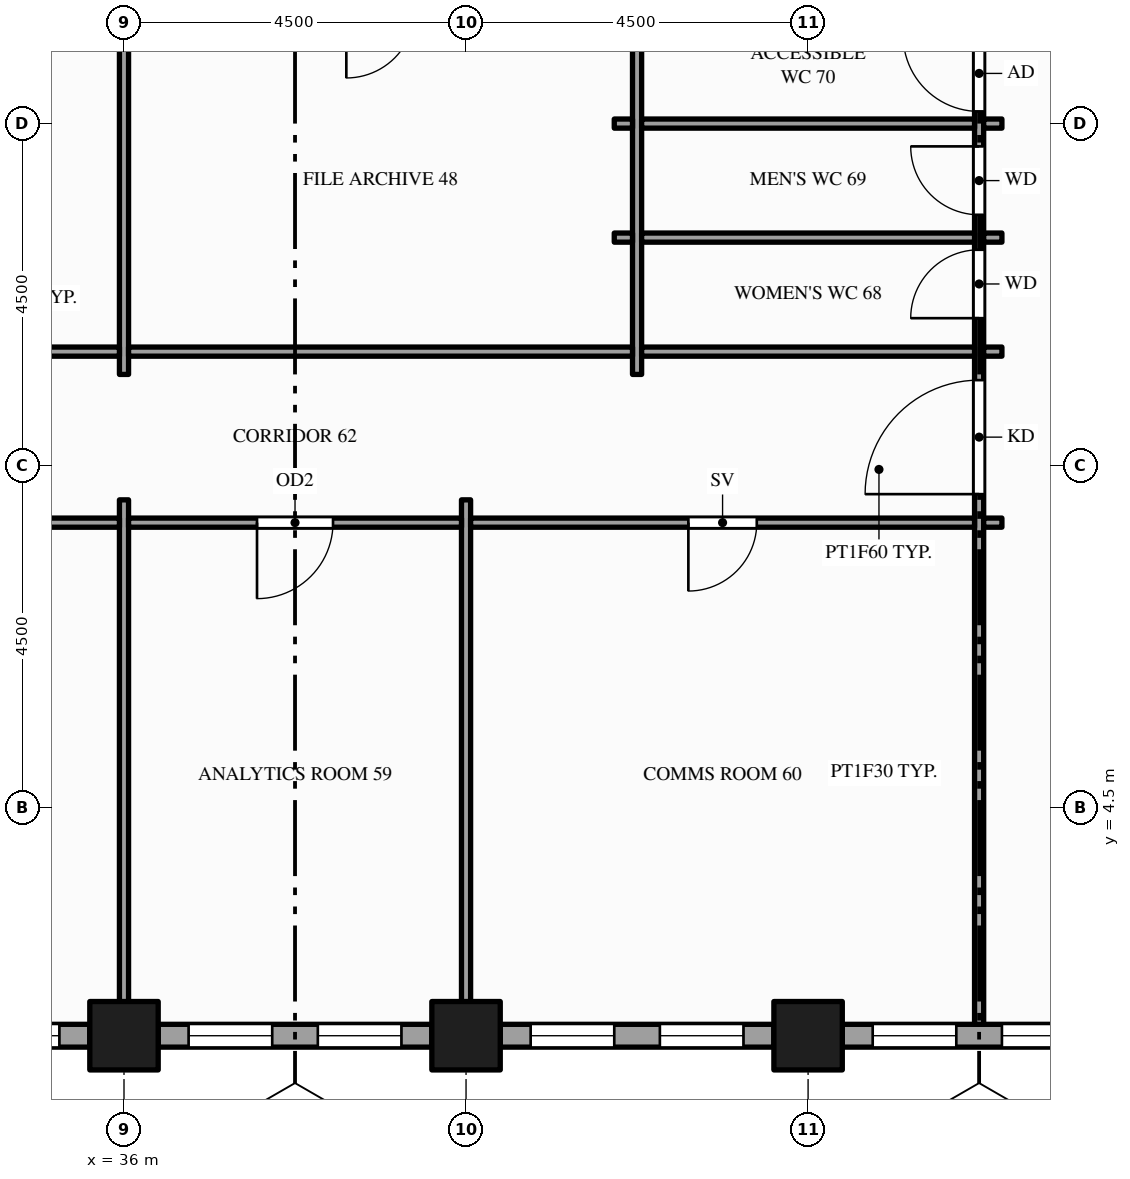
"""IFC4 building model, lengths in metres.
Left out: names, types, materials, properties, quantities, classifications, styles, units other than length and angle.
Written with IfcOpenShell. Run it as: python <this file> out.ifc"""

import sys

from ifc_helpers import new_model, si_unit, direction, frame, frame_2d, origin, origin_2d, place, context, subcontext, project, spatial, rectangle, hollow_rectangle, extrude, element, fill, save


model = new_model("IFC4")
c1 = context("Model", 3, precision=1e-05, world=origin(), true_north=direction((0.0, 1.0)))
c2 = subcontext(c1, "Body", "Model", "MODEL_VIEW")
j1 = project(units=[si_unit("LENGTHUNIT", "METRE"), si_unit("PLANEANGLEUNIT", "RADIAN")], contexts=[c1])
p1 = place(None, origin())
s1 = spatial("IfcSite", under=j1, at=p1, CompositionType="ELEMENT")
p2 = place(p1, origin())
s2 = spatial("IfcBuilding", under=s1, at=p2, CompositionType="ELEMENT")
p3 = place(p2, frame((0.0, 0.0, 171.0)))
s3 = spatial("IfcBuildingStorey", under=s2, at=p3, CompositionType="ELEMENT", Elevation=171.0)
for number, where, z_axis, x_axis in (
    (1, (36.0, 1.5, -0.15), (0.0, 0.0, 1.0), (1.0, 0.0, 0.0)),
    (2, (40.5, 1.5, -0.15), (0.0, 0.0, 1.0), (1.0, 0.0, 0.0)),
    (3, (45.0, 1.5, -0.15), (0.0, 0.0, 1.0), (1.0, 0.0, 0.0)),
):
    element("IfcColumn", number, at=place(p3, frame(where, z_axis=z_axis, x_axis=x_axis)), inside=s3, PredefinedType="COLUMN", context=c2, shape_type="SweptSolid", body=[
        extrude(hollow_rectangle(XDim=0.9, YDim=0.9, WallThickness=0.045, at=origin_2d()), origin(), (0.0, 0.0, 1.0), 4.0),
    ])
p4 = place(p3, frame((31.95, 1.5, 0.0), z_axis=(0.0, 0.0, 1.0), x_axis=(1.0, 0.0, 0.0)))
e4 = element("IfcWall", 4, at=p4, inside=s3, PredefinedType="STANDARD", context=c2, shape_type="SweptSolid", body=[
    extrude(rectangle(XDim=3.6, YDim=0.3, at=frame_2d((1.8, 0.0))), origin(), (0.0, 0.0, 1.0), 2.87),
])
p5 = place(p4, frame((0.4, 0.0, 0.9)))
e5 = element("IfcOpeningElement", 5, at=p5, cuts=e4, PredefinedType="OPENING", context=c2, shape_type="SweptSolid", body=[
    extrude(rectangle(XDim=1.1, YDim=1.75, at=frame_2d((0.55, 0.875))), frame((0.0, 0.16, 0.0), z_axis=(0.0, -1.0, 0.0), x_axis=(1.0, 0.0, 0.0)), (0.0, 0.0, 1.0), 0.32),
])
p6 = place(p4, frame((2.1, 0.0, 0.9)))
e6 = element("IfcOpeningElement", 6, at=p6, cuts=e4, PredefinedType="OPENING", context=c2, shape_type="SweptSolid", body=[
    extrude(rectangle(XDim=1.1, YDim=1.75, at=frame_2d((0.55, 0.875))), frame((0.0, 0.16, 0.0), z_axis=(0.0, -1.0, 0.0), x_axis=(1.0, 0.0, 0.0)), (0.0, 0.0, 1.0), 0.32),
])
p7 = place(p3, frame((36.45, 1.5, 0.0), z_axis=(0.0, 0.0, 1.0), x_axis=(1.0, 0.0, 0.0)))
e7 = element("IfcWall", 7, at=p7, inside=s3, PredefinedType="STANDARD", context=c2, shape_type="SweptSolid", body=[
    extrude(rectangle(XDim=3.6, YDim=0.3, at=frame_2d((1.8, 0.0))), origin(), (0.0, 0.0, 1.0), 2.87),
])
p8 = place(p7, frame((0.4, 0.0, 0.9)))
e8 = element("IfcOpeningElement", 8, at=p8, cuts=e7, PredefinedType="OPENING", context=c2, shape_type="SweptSolid", body=[
    extrude(rectangle(XDim=1.1, YDim=1.75, at=frame_2d((0.55, 0.875))), frame((0.0, 0.16, 0.0), z_axis=(0.0, -1.0, 0.0), x_axis=(1.0, 0.0, 0.0)), (0.0, 0.0, 1.0), 0.32),
])
p9 = place(p7, frame((2.1, 0.0, 0.9)))
e9 = element("IfcOpeningElement", 9, at=p9, cuts=e7, PredefinedType="OPENING", context=c2, shape_type="SweptSolid", body=[
    extrude(rectangle(XDim=1.1, YDim=1.75, at=frame_2d((0.55, 0.875))), frame((0.0, 0.16, 0.0), z_axis=(0.0, -1.0, 0.0), x_axis=(1.0, 0.0, 0.0)), (0.0, 0.0, 1.0), 0.32),
])
p10 = place(p3, frame((40.95, 1.5, 0.0), z_axis=(0.0, 0.0, 1.0), x_axis=(1.0, 0.0, 0.0)))
e10 = element("IfcWall", 10, at=p10, inside=s3, PredefinedType="STANDARD", context=c2, shape_type="SweptSolid", body=[
    extrude(rectangle(XDim=3.6, YDim=0.3, at=frame_2d((1.8, 0.0))), origin(), (0.0, 0.0, 1.0), 2.87),
])
p11 = place(p10, frame((0.4, 0.0, 0.9)))
e11 = element("IfcOpeningElement", 11, at=p11, cuts=e10, PredefinedType="OPENING", context=c2, shape_type="SweptSolid", body=[
    extrude(rectangle(XDim=1.1, YDim=1.75, at=frame_2d((0.55, 0.875))), frame((0.0, 0.16, 0.0), z_axis=(0.0, -1.0, 0.0), x_axis=(1.0, 0.0, 0.0)), (0.0, 0.0, 1.0), 0.32),
])
p12 = place(p10, frame((2.1, 0.0, 0.9)))
e12 = element("IfcOpeningElement", 12, at=p12, cuts=e10, PredefinedType="OPENING", context=c2, shape_type="SweptSolid", body=[
    extrude(rectangle(XDim=1.1, YDim=1.75, at=frame_2d((0.55, 0.875))), frame((0.0, 0.16, 0.0), z_axis=(0.0, -1.0, 0.0), x_axis=(1.0, 0.0, 0.0)), (0.0, 0.0, 1.0), 0.32),
])
p13 = place(p3, frame((45.45, 1.5, 0.0), z_axis=(0.0, 0.0, 1.0), x_axis=(1.0, 0.0, 0.0)))
e13 = element("IfcWall", 13, at=p13, inside=s3, PredefinedType="STANDARD", context=c2, shape_type="SweptSolid", body=[
    extrude(rectangle(XDim=3.6, YDim=0.3, at=frame_2d((1.8, 0.0))), origin(), (0.0, 0.0, 1.0), 2.87),
])
p14 = place(p13, frame((0.4, 0.0, 0.9)))
e14 = element("IfcOpeningElement", 14, at=p14, cuts=e13, PredefinedType="OPENING", context=c2, shape_type="SweptSolid", body=[
    extrude(rectangle(XDim=1.1, YDim=1.75, at=frame_2d((0.55, 0.875))), frame((0.0, 0.16, 0.0), z_axis=(0.0, -1.0, 0.0), x_axis=(1.0, 0.0, 0.0)), (0.0, 0.0, 1.0), 0.32),
])
p15 = place(p13, frame((2.1, 0.0, 0.9)))
e15 = element("IfcOpeningElement", 15, at=p15, cuts=e13, PredefinedType="OPENING", context=c2, shape_type="SweptSolid", body=[
    extrude(rectangle(XDim=1.1, YDim=1.75, at=frame_2d((0.55, 0.875))), frame((0.0, 0.16, 0.0), z_axis=(0.0, -1.0, 0.0), x_axis=(1.0, 0.0, 0.0)), (0.0, 0.0, 1.0), 0.32),
])
p16 = place(p3, frame((36.0, 1.65, 0.0), z_axis=(0.0, 0.0, 1.0), x_axis=(0.0, 1.0, 0.0)))
e16 = element("IfcWall", 16, at=p16, inside=s3, PredefinedType="PARTITIONING", context=c2, shape_type="SweptSolid", body=[
    extrude(rectangle(XDim=6.9, YDim=0.12, at=frame_2d((3.45, 0.0))), origin(), (0.0, 0.0, 1.0), 2.87),
])
p17 = place(p3, frame((36.0, 10.2, 0.0), z_axis=(0.0, 0.0, 1.0), x_axis=(0.0, 1.0, 0.0)))
e17 = element("IfcWall", 17, at=p17, inside=s3, PredefinedType="PARTITIONING", context=c2, shape_type="SweptSolid", body=[
    extrude(rectangle(XDim=5.1, YDim=0.12, at=frame_2d((2.55, 0.0))), origin(), (0.0, 0.0, 1.0), 2.87),
])
p18 = place(p3, frame((40.5, 1.65, 0.0), z_axis=(0.0, 0.0, 1.0), x_axis=(0.0, 1.0, 0.0)))
e18 = element("IfcWall", 18, at=p18, inside=s3, PredefinedType="PARTITIONING", context=c2, shape_type="SweptSolid", body=[
    extrude(rectangle(XDim=6.9, YDim=0.12, at=frame_2d((3.45, 0.0))), origin(), (0.0, 0.0, 1.0), 2.87),
])
p19 = place(p3, frame((42.75, 10.2, 0.0), z_axis=(0.0, 0.0, 1.0), x_axis=(0.0, 1.0, 0.0)))
e19 = element("IfcWall", 19, at=p19, inside=s3, PredefinedType="PARTITIONING", context=c2, shape_type="SweptSolid", body=[
    extrude(rectangle(XDim=5.1, YDim=0.12, at=frame_2d((2.55, 0.0))), origin(), (0.0, 0.0, 1.0), 2.87),
])
p20 = place(p3, frame((47.25, 1.65, 0.0), z_axis=(0.0, 0.0, 1.0), x_axis=(0.0, 1.0, 0.0)))
e20 = element("IfcWall", 20, at=p20, inside=s3, PredefinedType="PARTITIONING", context=c2, shape_type="SweptSolid", body=[
    extrude(rectangle(XDim=22.2, YDim=0.12, at=frame_2d((11.1, 0.0))), origin(), (0.0, 0.0, 1.0), 2.87),
])
p21 = place(p20, frame((6.975, 0.0, 0.0)))
e21 = element("IfcOpeningElement", 21, at=p21, cuts=e20, PredefinedType="OPENING", context=c2, shape_type="SweptSolid", body=[
    extrude(rectangle(XDim=1.5, YDim=2.1, at=frame_2d((0.75, 1.05))), frame((0.0, 0.07, 0.0), z_axis=(0.0, -1.0, 0.0), x_axis=(1.0, 0.0, 0.0)), (0.0, 0.0, 1.0), 0.14),
])
p22 = place(p20, frame((13.725, 0.0, 0.0)))
e22 = element("IfcOpeningElement", 22, at=p22, cuts=e20, PredefinedType="OPENING", context=c2, shape_type="SweptSolid", body=[
    extrude(rectangle(XDim=1.5, YDim=2.1, at=frame_2d((0.75, 1.05))), frame((0.0, 0.07, 0.0), z_axis=(0.0, -1.0, 0.0), x_axis=(1.0, 0.0, 0.0)), (0.0, 0.0, 1.0), 0.14),
])
p23 = place(p20, frame((9.29, 0.0, 0.0)))
e23 = element("IfcOpeningElement", 23, at=p23, cuts=e20, PredefinedType="OPENING", context=c2, shape_type="SweptSolid", body=[
    extrude(rectangle(XDim=0.9, YDim=2.1, at=frame_2d((0.45, 1.05))), frame((0.0, 0.07, 0.0), z_axis=(0.0, -1.0, 0.0), x_axis=(1.0, 0.0, 0.0)), (0.0, 0.0, 1.0), 0.14),
])
p24 = place(p20, frame((10.65, 0.0, 0.0)))
e24 = element("IfcOpeningElement", 24, at=p24, cuts=e20, PredefinedType="OPENING", context=c2, shape_type="SweptSolid", body=[
    extrude(rectangle(XDim=0.9, YDim=2.1, at=frame_2d((0.45, 1.05))), frame((0.0, 0.07, 0.0), z_axis=(0.0, -1.0, 0.0), x_axis=(1.0, 0.0, 0.0)), (0.0, 0.0, 1.0), 0.14),
])
p25 = place(p20, frame((12.01, 0.0, 0.0)))
e25 = element("IfcOpeningElement", 25, at=p25, cuts=e20, PredefinedType="OPENING", context=c2, shape_type="SweptSolid", body=[
    extrude(rectangle(XDim=1.0, YDim=2.1, at=frame_2d((0.5, 1.05))), frame((0.0, 0.07, 0.0), z_axis=(0.0, -1.0, 0.0), x_axis=(1.0, 0.0, 0.0)), (0.0, 0.0, 1.0), 0.14),
])
p26 = place(p3, frame((29.31, 8.25, 0.0), z_axis=(0.0, 0.0, 1.0), x_axis=(1.0, 0.0, 0.0)))
e26 = element("IfcWall", 26, at=p26, inside=s3, PredefinedType="PARTITIONING", context=c2, shape_type="SweptSolid", body=[
    extrude(rectangle(XDim=6.63, YDim=0.12, at=frame_2d((3.315, 0.0))), origin(), (0.0, 0.0, 1.0), 2.87),
])
p27 = place(p26, frame((2.415, 0.0, 0.0)))
e27 = element("IfcOpeningElement", 27, at=p27, cuts=e26, PredefinedType="OPENING", context=c2, shape_type="SweptSolid", body=[
    extrude(rectangle(XDim=1.8, YDim=2.1, at=frame_2d((0.9, 1.05))), frame((0.0, 0.07, 0.0), z_axis=(0.0, -1.0, 0.0), x_axis=(1.0, 0.0, 0.0)), (0.0, 0.0, 1.0), 0.14),
])
p28 = place(p3, frame((36.06, 8.25, 0.0), z_axis=(0.0, 0.0, 1.0), x_axis=(1.0, 0.0, 0.0)))
e28 = element("IfcWall", 28, at=p28, inside=s3, PredefinedType="PARTITIONING", context=c2, shape_type="SweptSolid", body=[
    extrude(rectangle(XDim=4.38, YDim=0.12, at=frame_2d((2.19, 0.0))), origin(), (0.0, 0.0, 1.0), 2.87),
])
p29 = place(p28, frame((1.69, 0.0, 0.0)))
e29 = element("IfcOpeningElement", 29, at=p29, cuts=e28, PredefinedType="OPENING", context=c2, shape_type="SweptSolid", body=[
    extrude(rectangle(XDim=1.0, YDim=2.1, at=frame_2d((0.5, 1.05))), frame((0.0, 0.07, 0.0), z_axis=(0.0, -1.0, 0.0), x_axis=(1.0, 0.0, 0.0)), (0.0, 0.0, 1.0), 0.14),
])
p30 = place(p3, frame((40.56, 8.25, 0.0), z_axis=(0.0, 0.0, 1.0), x_axis=(1.0, 0.0, 0.0)))
e30 = element("IfcWall", 30, at=p30, inside=s3, PredefinedType="PARTITIONING", context=c2, shape_type="SweptSolid", body=[
    extrude(rectangle(XDim=6.63, YDim=0.12, at=frame_2d((3.315, 0.0))), origin(), (0.0, 0.0, 1.0), 2.87),
])
p31 = place(p30, frame((2.865, 0.0, 0.0)))
e31 = element("IfcOpeningElement", 31, at=p31, cuts=e30, PredefinedType="OPENING", context=c2, shape_type="SweptSolid", body=[
    extrude(rectangle(XDim=0.9, YDim=2.1, at=frame_2d((0.45, 1.05))), frame((0.0, 0.07, 0.0), z_axis=(0.0, -1.0, 0.0), x_axis=(1.0, 0.0, 0.0)), (0.0, 0.0, 1.0), 0.14),
])
p32 = place(p3, frame((47.31, 8.25, 0.0), z_axis=(0.0, 0.0, 1.0), x_axis=(1.0, 0.0, 0.0)))
e32 = element("IfcWall", 32, at=p32, inside=s3, PredefinedType="PARTITIONING", context=c2, shape_type="SweptSolid", body=[
    extrude(rectangle(XDim=0.24, YDim=0.12, at=frame_2d((0.12, 0.0))), origin(), (0.0, 0.0, 1.0), 2.87),
])
p33 = place(p3, frame((29.31, 10.5, 0.0), z_axis=(0.0, 0.0, 1.0), x_axis=(1.0, 0.0, 0.0)))
e33 = element("IfcWall", 33, at=p33, inside=s3, PredefinedType="PARTITIONING", context=c2, shape_type="SweptSolid", body=[
    extrude(rectangle(XDim=6.63, YDim=0.12, at=frame_2d((3.315, 0.0))), origin(), (0.0, 0.0, 1.0), 2.87),
])
p34 = place(p33, frame((2.865, 0.0, 0.0)))
e34 = element("IfcOpeningElement", 34, at=p34, cuts=e33, PredefinedType="OPENING", context=c2, shape_type="SweptSolid", body=[
    extrude(rectangle(XDim=0.9, YDim=2.1, at=frame_2d((0.45, 1.05))), frame((0.0, 0.07, 0.0), z_axis=(0.0, -1.0, 0.0), x_axis=(1.0, 0.0, 0.0)), (0.0, 0.0, 1.0), 0.14),
])
p35 = place(p3, frame((36.06, 10.5, 0.0), z_axis=(0.0, 0.0, 1.0), x_axis=(1.0, 0.0, 0.0)))
e35 = element("IfcWall", 35, at=p35, inside=s3, PredefinedType="PARTITIONING", context=c2, shape_type="SweptSolid", body=[
    extrude(rectangle(XDim=6.63, YDim=0.12, at=frame_2d((3.315, 0.0))), origin(), (0.0, 0.0, 1.0), 2.87),
])
p36 = place(p3, frame((42.81, 10.5, 0.0), z_axis=(0.0, 0.0, 1.0), x_axis=(1.0, 0.0, 0.0)))
e36 = element("IfcWall", 36, at=p36, inside=s3, PredefinedType="PARTITIONING", context=c2, shape_type="SweptSolid", body=[
    extrude(rectangle(XDim=4.38, YDim=0.12, at=frame_2d((2.19, 0.0))), origin(), (0.0, 0.0, 1.0), 2.87),
])
for number, where, z_axis, x_axis in (
    (37, (47.31, 10.5, 0.0), (0.0, 0.0, 1.0), (1.0, 0.0, 0.0)),
    (38, (42.45, 12.0, 0.0), (0.0, 0.0, 1.0), (1.0, 0.0, 0.0)),
):
    element("IfcWall", number, at=place(p3, frame(where, z_axis=z_axis, x_axis=x_axis)), inside=s3, PredefinedType="PARTITIONING", context=c2, shape_type="SweptSolid", body=[
        extrude(rectangle(XDim=0.24, YDim=0.12, at=frame_2d((0.12, 0.0))), origin(), (0.0, 0.0, 1.0), 2.87),
    ])
p37 = place(p3, frame((42.81, 12.0, 0.0), z_axis=(0.0, 0.0, 1.0), x_axis=(1.0, 0.0, 0.0)))
e39 = element("IfcWall", 39, at=p37, inside=s3, PredefinedType="PARTITIONING", context=c2, shape_type="SweptSolid", body=[
    extrude(rectangle(XDim=4.38, YDim=0.12, at=frame_2d((2.19, 0.0))), origin(), (0.0, 0.0, 1.0), 2.87),
])
for number, where, z_axis, x_axis in (
    (40, (47.31, 12.0, 0.0), (0.0, 0.0, 1.0), (1.0, 0.0, 0.0)),
    (41, (42.45, 13.5, 0.0), (0.0, 0.0, 1.0), (1.0, 0.0, 0.0)),
):
    element("IfcWall", number, at=place(p3, frame(where, z_axis=z_axis, x_axis=x_axis)), inside=s3, PredefinedType="PARTITIONING", context=c2, shape_type="SweptSolid", body=[
        extrude(rectangle(XDim=0.24, YDim=0.12, at=frame_2d((0.12, 0.0))), origin(), (0.0, 0.0, 1.0), 2.87),
    ])
p38 = place(p3, frame((42.81, 13.5, 0.0), z_axis=(0.0, 0.0, 1.0), x_axis=(1.0, 0.0, 0.0)))
e42 = element("IfcWall", 42, at=p38, inside=s3, PredefinedType="PARTITIONING", context=c2, shape_type="SweptSolid", body=[
    extrude(rectangle(XDim=4.38, YDim=0.12, at=frame_2d((2.19, 0.0))), origin(), (0.0, 0.0, 1.0), 2.87),
])
p39 = place(p3, frame((47.31, 13.5, 0.0), z_axis=(0.0, 0.0, 1.0), x_axis=(1.0, 0.0, 0.0)))
e43 = element("IfcWall", 43, at=p39, inside=s3, PredefinedType="PARTITIONING", context=c2, shape_type="SweptSolid", body=[
    extrude(rectangle(XDim=0.24, YDim=0.12, at=frame_2d((0.12, 0.0))), origin(), (0.0, 0.0, 1.0), 2.87),
])
p40 = place(p6, origin())
e44 = element("IfcWindow", 44, at=p40, inside=s3, PartitioningType="SINGLE_PANEL", PredefinedType="WINDOW", context=c2, shape_type="SweptSolid", body=[
    extrude(rectangle(XDim=1.1, YDim=1.75, at=frame_2d((0.55, 0.875))), frame((0.0, 0.03, 0.0), z_axis=(0.0, -1.0, 0.0), x_axis=(1.0, 0.0, 0.0)), (0.0, 0.0, 1.0), 0.06),
])
fill(e6, e44)
p41 = place(p8, origin())
e45 = element("IfcWindow", 45, at=p41, inside=s3, PartitioningType="SINGLE_PANEL", PredefinedType="WINDOW", context=c2, shape_type="SweptSolid", body=[
    extrude(rectangle(XDim=1.1, YDim=1.75, at=frame_2d((0.55, 0.875))), frame((0.0, 0.03, 0.0), z_axis=(0.0, -1.0, 0.0), x_axis=(1.0, 0.0, 0.0)), (0.0, 0.0, 1.0), 0.06),
])
fill(e8, e45)
p42 = place(p9, origin())
e46 = element("IfcWindow", 46, at=p42, inside=s3, PartitioningType="SINGLE_PANEL", PredefinedType="WINDOW", context=c2, shape_type="SweptSolid", body=[
    extrude(rectangle(XDim=1.1, YDim=1.75, at=frame_2d((0.55, 0.875))), frame((0.0, 0.03, 0.0), z_axis=(0.0, -1.0, 0.0), x_axis=(1.0, 0.0, 0.0)), (0.0, 0.0, 1.0), 0.06),
])
fill(e9, e46)
p43 = place(p11, origin())
e47 = element("IfcWindow", 47, at=p43, inside=s3, PartitioningType="SINGLE_PANEL", PredefinedType="WINDOW", context=c2, shape_type="SweptSolid", body=[
    extrude(rectangle(XDim=1.1, YDim=1.75, at=frame_2d((0.55, 0.875))), frame((0.0, 0.03, 0.0), z_axis=(0.0, -1.0, 0.0), x_axis=(1.0, 0.0, 0.0)), (0.0, 0.0, 1.0), 0.06),
])
fill(e11, e47)
p44 = place(p12, origin())
e48 = element("IfcWindow", 48, at=p44, inside=s3, PartitioningType="SINGLE_PANEL", PredefinedType="WINDOW", context=c2, shape_type="SweptSolid", body=[
    extrude(rectangle(XDim=1.1, YDim=1.75, at=frame_2d((0.55, 0.875))), frame((0.0, 0.03, 0.0), z_axis=(0.0, -1.0, 0.0), x_axis=(1.0, 0.0, 0.0)), (0.0, 0.0, 1.0), 0.06),
])
fill(e12, e48)
p45 = place(p14, origin())
e49 = element("IfcWindow", 49, at=p45, inside=s3, PartitioningType="SINGLE_PANEL", PredefinedType="WINDOW", context=c2, shape_type="SweptSolid", body=[
    extrude(rectangle(XDim=1.1, YDim=1.75, at=frame_2d((0.55, 0.875))), frame((0.0, 0.03, 0.0), z_axis=(0.0, -1.0, 0.0), x_axis=(1.0, 0.0, 0.0)), (0.0, 0.0, 1.0), 0.06),
])
fill(e14, e49)
p46 = place(p15, origin())
e50 = element("IfcWindow", 50, at=p46, inside=s3, PartitioningType="SINGLE_PANEL", PredefinedType="WINDOW", context=c2, shape_type="SweptSolid", body=[
    extrude(rectangle(XDim=1.1, YDim=1.75, at=frame_2d((0.55, 0.875))), frame((0.0, 0.03, 0.0), z_axis=(0.0, -1.0, 0.0), x_axis=(1.0, 0.0, 0.0)), (0.0, 0.0, 1.0), 0.06),
])
fill(e15, e50)
p47 = place(p21, origin())
e51 = element("IfcDoor", 51, at=p47, inside=s3, OperationType="SINGLE_SWING_LEFT", PredefinedType="DOOR", context=c2, shape_type="SweptSolid", body=[
    extrude(rectangle(XDim=1.5, YDim=2.1, at=frame_2d((0.75, 1.05))), frame((0.0, 0.025, 0.0), z_axis=(0.0, -1.0, 0.0), x_axis=(1.0, 0.0, 0.0)), (0.0, 0.0, 1.0), 0.05),
])
fill(e21, e51)
p48 = place(p23, origin())
e52 = element("IfcDoor", 52, at=p48, inside=s3, OperationType="SINGLE_SWING_LEFT", PredefinedType="DOOR", context=c2, shape_type="SweptSolid", body=[
    extrude(rectangle(XDim=0.9, YDim=2.1, at=frame_2d((0.45, 1.05))), frame((0.0, 0.025, 0.0), z_axis=(0.0, -1.0, 0.0), x_axis=(1.0, 0.0, 0.0)), (0.0, 0.0, 1.0), 0.05),
])
fill(e23, e52)
p49 = place(p24, origin())
e53 = element("IfcDoor", 53, at=p49, inside=s3, OperationType="SINGLE_SWING_RIGHT", PredefinedType="DOOR", context=c2, shape_type="SweptSolid", body=[
    extrude(rectangle(XDim=0.9, YDim=2.1, at=frame_2d((0.45, 1.05))), frame((0.0, 0.025, 0.0), z_axis=(0.0, -1.0, 0.0), x_axis=(1.0, 0.0, 0.0)), (0.0, 0.0, 1.0), 0.05),
])
fill(e24, e53)
p50 = place(p25, origin())
e54 = element("IfcDoor", 54, at=p50, inside=s3, OperationType="SINGLE_SWING_RIGHT", PredefinedType="DOOR", context=c2, shape_type="SweptSolid", body=[
    extrude(rectangle(XDim=1.0, YDim=2.1, at=frame_2d((0.5, 1.05))), frame((0.0, 0.025, 0.0), z_axis=(0.0, -1.0, 0.0), x_axis=(1.0, 0.0, 0.0)), (0.0, 0.0, 1.0), 0.05),
])
fill(e25, e54)
p51 = place(p29, origin())
e55 = element("IfcDoor", 55, at=p51, inside=s3, OperationType="SINGLE_SWING_LEFT", PredefinedType="DOOR", context=c2, shape_type="SweptSolid", body=[
    extrude(rectangle(XDim=1.0, YDim=2.1, at=frame_2d((0.5, 1.05))), frame((0.0, 0.025, 0.0), z_axis=(0.0, -1.0, 0.0), x_axis=(1.0, 0.0, 0.0)), (0.0, 0.0, 1.0), 0.05),
])
fill(e29, e55)
p52 = place(p31, origin())
e56 = element("IfcDoor", 56, at=p52, inside=s3, OperationType="SINGLE_SWING_LEFT", PredefinedType="DOOR", context=c2, shape_type="SweptSolid", body=[
    extrude(rectangle(XDim=0.9, YDim=2.1, at=frame_2d((0.45, 1.05))), frame((0.0, 0.025, 0.0), z_axis=(0.0, -1.0, 0.0), x_axis=(1.0, 0.0, 0.0)), (0.0, 0.0, 1.0), 0.05),
])
fill(e31, e56)
save(model, sys.argv[1])
